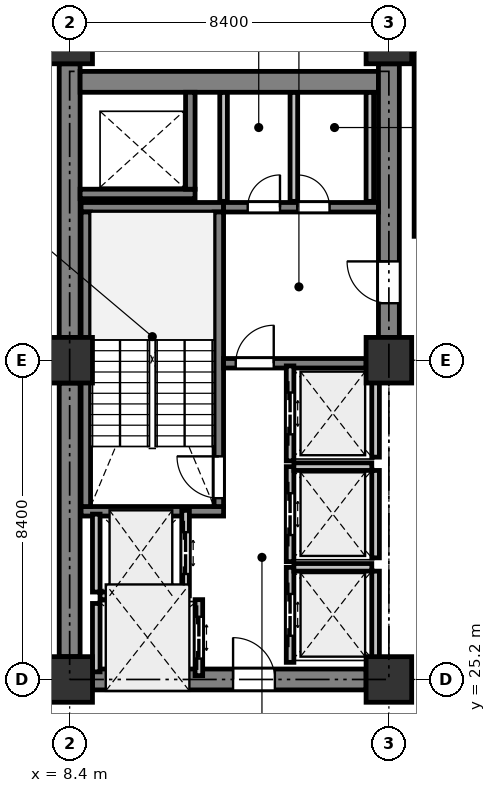
"""IFC4 building model, lengths in metres.
Left out: names, types, materials, properties, quantities, classifications, styles, units other than length and angle.
Written with IfcOpenShell. Run it as: python <this file> out.ifc"""

import sys

from ifc_helpers import new_model, si_unit, direction, frame, frame_2d, origin, origin_2d, place, context, subcontext, project, spatial, rectangle, extrude, element, fill, save


model = new_model("IFC4")
c1 = context("Model", 3, precision=1e-05, world=origin(), true_north=direction((0.0, 1.0)))
c2 = subcontext(c1, "Body", "Model", "MODEL_VIEW")
j1 = project(units=[si_unit("LENGTHUNIT", "METRE"), si_unit("PLANEANGLEUNIT", "RADIAN")], contexts=[c1])
p1 = place(None, origin())
s1 = spatial("IfcSite", under=j1, at=p1, CompositionType="ELEMENT")
p2 = place(p1, origin())
s2 = spatial("IfcBuilding", under=s1, at=p2, CompositionType="ELEMENT")
p3 = place(p2, frame((0.0, 0.0, 84.4)))
s3 = spatial("IfcBuildingStorey", under=s2, at=p3, CompositionType="ELEMENT", Elevation=84.4)
for number, where, z_axis, x_axis in (
    (1, (8.4, 25.2, 0.0), (0.0, 0.0, 1.0), (1.0, 0.0, 0.0)),
    (2, (8.4, 33.6, 0.0), (0.0, 0.0, 1.0), (1.0, 0.0, 0.0)),
    (3, (8.4, 42.0, 0.0), (0.0, 0.0, 1.0), (1.0, 0.0, 0.0)),
    (4, (16.8, 25.2, 0.0), (0.0, 0.0, 1.0), (1.0, 0.0, 0.0)),
    (5, (16.8, 33.6, 0.0), (0.0, 0.0, 1.0), (1.0, 0.0, 0.0)),
    (6, (16.8, 42.0, 0.0), (0.0, 0.0, 1.0), (1.0, 0.0, 0.0)),
):
    element("IfcColumn", number, at=place(p3, frame(where, z_axis=z_axis, x_axis=x_axis)), inside=s3, PredefinedType="COLUMN", context=c2, shape_type="SweptSolid", body=[
        extrude(rectangle(XDim=1.2, YDim=1.2, at=origin_2d()), origin(), (0.0, 0.0, 1.0), 4.1),
    ])
for number, where, z_axis, x_axis in (
    (7, (8.4, 25.8, 0.0), (0.0, 0.0, 1.0), (0.0, 1.0, 0.0)),
    (8, (8.4, 34.2, 0.0), (0.0, 0.0, 1.0), (0.0, 1.0, 0.0)),
):
    element("IfcWall", number, at=place(p3, frame(where, z_axis=z_axis, x_axis=x_axis)), inside=s3, PredefinedType="SHEAR", context=c2, shape_type="SweptSolid", body=[
        extrude(rectangle(XDim=7.2, YDim=0.55, at=frame_2d((3.6, 0.0))), origin(), (0.0, 0.0, 1.0), 3.825),
    ])
p4 = place(p3, frame((8.675, 40.925, 0.0), z_axis=(0.0, 0.0, 1.0), x_axis=(1.0, 0.0, 0.0)))
e9 = element("IfcWall", 9, at=p4, inside=s3, PredefinedType="SHEAR", context=c2, shape_type="SweptSolid", body=[
    extrude(rectangle(XDim=7.85, YDim=0.55, at=frame_2d((3.925, 0.0))), origin(), (0.0, 0.0, 1.0), 3.825),
])
p5 = place(p3, frame((16.8, 34.2, 0.0), z_axis=(0.0, 0.0, 1.0), x_axis=(0.0, 1.0, 0.0)))
e10 = element("IfcWall", 10, at=p5, inside=s3, PredefinedType="SHEAR", context=c2, shape_type="SweptSolid", body=[
    extrude(rectangle(XDim=7.2, YDim=0.55, at=frame_2d((3.6, 0.0))), origin(), (0.0, 0.0, 1.0), 3.825),
])
p6 = place(p5, frame((0.9, 0.0, 0.0)))
e11 = element("IfcOpeningElement", 11, at=p6, cuts=e10, PredefinedType="OPENING", context=c2, shape_type="SweptSolid", body=[
    extrude(rectangle(XDim=1.1, YDim=2.15, at=frame_2d((0.55, 1.075))), frame((0.0, 0.285, 0.0), z_axis=(0.0, -1.0, 0.0), x_axis=(1.0, 0.0, 0.0)), (0.0, 0.0, 1.0), 0.57),
])
p7 = place(p3, frame((9.0, 25.2, 0.0), z_axis=(0.0, 0.0, 1.0), x_axis=(1.0, 0.0, 0.0)))
e12 = element("IfcWall", 12, at=p7, inside=s3, PredefinedType="SHEAR", context=c2, shape_type="SweptSolid", body=[
    extrude(rectangle(XDim=7.2, YDim=0.55, at=frame_2d((3.6, 0.0))), origin(), (0.0, 0.0, 1.0), 3.825),
])
p8 = place(p7, frame((3.7, 0.0, 0.0)))
e13 = element("IfcOpeningElement", 13, at=p8, cuts=e12, PredefinedType="OPENING", context=c2, shape_type="SweptSolid", body=[
    extrude(rectangle(XDim=1.1, YDim=2.15, at=frame_2d((0.55, 1.075))), frame((0.0, 0.285, 0.0), z_axis=(0.0, -1.0, 0.0), x_axis=(1.0, 0.0, 0.0)), (0.0, 0.0, 1.0), 0.57),
])
for number, where, z_axis, x_axis in (
    (14, (12.45, 29.625, 0.0), (0.0, 0.0, 1.0), (-1.0, 0.0, 0.0)),
    (15, (12.45, 37.625, 0.0), (0.0, 0.0, 1.0), (-1.0, 0.0, 0.0)),
):
    element("IfcWall", number, at=place(p3, frame(where, z_axis=z_axis, x_axis=x_axis)), inside=s3, PredefinedType="SHEAR", context=c2, shape_type="SweptSolid", body=[
        extrude(rectangle(XDim=3.75, YDim=0.25, at=frame_2d((1.875, 0.0))), origin(), (0.0, 0.0, 1.0), 3.825),
    ])
p9 = place(p3, frame((12.325, 29.75, 0.0), z_axis=(0.0, 0.0, 1.0), x_axis=(0.0, 1.0, 0.0)))
e16 = element("IfcWall", 16, at=p9, inside=s3, PredefinedType="SHEAR", context=c2, shape_type="SweptSolid", body=[
    extrude(rectangle(XDim=7.75, YDim=0.25, at=frame_2d((3.875, 0.0))), origin(), (0.0, 0.0, 1.0), 3.825),
])
p10 = place(p9, frame((0.22, 0.0, 0.0)))
e17 = element("IfcOpeningElement", 17, at=p10, cuts=e16, PredefinedType="OPENING", context=c2, shape_type="SweptSolid", body=[
    extrude(rectangle(XDim=1.1, YDim=2.15, at=frame_2d((0.55, 1.075))), frame((0.0, 0.135, 0.0), z_axis=(0.0, -1.0, 0.0), x_axis=(1.0, 0.0, 0.0)), (0.0, 0.0, 1.0), 0.27),
])
p11 = place(p3, frame((8.825, 29.75, 0.0), z_axis=(0.0, 0.0, 1.0), x_axis=(0.0, 1.0, 0.0)))
e18 = element("IfcWall", 18, at=p11, inside=s3, PredefinedType="SHEAR", context=c2, shape_type="SweptSolid", body=[
    extrude(rectangle(XDim=7.75, YDim=0.25, at=frame_2d((3.875, 0.0))), origin(), (0.0, 0.0, 1.0), 3.825),
])
p12 = place(p3, frame((8.675, 37.975, 0.0), z_axis=(0.0, 0.0, 1.0), x_axis=(1.0, 0.0, 0.0)))
e19 = element("IfcWall", 19, at=p12, inside=s3, PredefinedType="SHEAR", context=c2, shape_type="SweptSolid", body=[
    extrude(rectangle(XDim=3.025, YDim=0.25, at=frame_2d((1.512, 0.0))), origin(), (0.0, 0.0, 1.0), 3.825),
])
p13 = place(p3, frame((11.575, 38.1, 0.0), z_axis=(0.0, 0.0, 1.0), x_axis=(0.0, 1.0, 0.0)))
e20 = element("IfcWall", 20, at=p13, inside=s3, PredefinedType="SHEAR", context=c2, shape_type="SweptSolid", body=[
    extrude(rectangle(XDim=2.55, YDim=0.25, at=frame_2d((1.275, 0.0))), origin(), (0.0, 0.0, 1.0), 3.825),
])
p14 = place(p3, frame((12.45, 33.52, 0.0), z_axis=(0.0, 0.0, 1.0), x_axis=(1.0, 0.0, 0.0)))
e21 = element("IfcWall", 21, at=p14, inside=s3, PredefinedType="SHEAR", context=c2, shape_type="SweptSolid", body=[
    extrude(rectangle(XDim=3.75, YDim=0.25, at=frame_2d((1.875, 0.0))), origin(), (0.0, 0.0, 1.0), 3.825),
])
p15 = place(p14, frame((0.32, 0.0, 0.0)))
e22 = element("IfcOpeningElement", 22, at=p15, cuts=e21, PredefinedType="OPENING", context=c2, shape_type="SweptSolid", body=[
    extrude(rectangle(XDim=1.0, YDim=2.15, at=frame_2d((0.5, 1.075))), frame((0.0, 0.135, 0.0), z_axis=(0.0, -1.0, 0.0), x_axis=(1.0, 0.0, 0.0)), (0.0, 0.0, 1.0), 0.27),
])
p16 = place(p3, frame((12.45, 37.625, 0.0), z_axis=(0.0, 0.0, 1.0), x_axis=(1.0, 0.0, 0.0)))
e23 = element("IfcWall", 23, at=p16, inside=s3, PredefinedType="SHEAR", context=c2, shape_type="SweptSolid", body=[
    extrude(rectangle(XDim=4.075, YDim=0.25, at=frame_2d((2.038, 0.0))), origin(), (0.0, 0.0, 1.0), 3.825),
])
p17 = place(p16, frame((0.635, 0.0, 0.0)))
e24 = element("IfcOpeningElement", 24, at=p17, cuts=e23, PredefinedType="OPENING", context=c2, shape_type="SweptSolid", body=[
    extrude(rectangle(XDim=0.85, YDim=2.15, at=frame_2d((0.425, 1.075))), frame((0.0, 0.135, 0.0), z_axis=(0.0, -1.0, 0.0), x_axis=(1.0, 0.0, 0.0)), (0.0, 0.0, 1.0), 0.27),
])
p18 = place(p16, frame((1.938, 0.0, 0.0)))
e25 = element("IfcOpeningElement", 25, at=p18, cuts=e23, PredefinedType="OPENING", context=c2, shape_type="SweptSolid", body=[
    extrude(rectangle(XDim=0.85, YDim=2.15, at=frame_2d((0.425, 1.075))), frame((0.0, 0.135, 0.0), z_axis=(0.0, -1.0, 0.0), x_axis=(1.0, 0.0, 0.0)), (0.0, 0.0, 1.0), 0.27),
])
p19 = place(p3, frame((11.45, 27.4, 0.0), z_axis=(0.0, 0.0, 1.0), x_axis=(0.0, 1.0, 0.0)))
e26 = element("IfcWall", 26, at=p19, inside=s3, PredefinedType="PARTITIONING", context=c2, shape_type="SweptSolid", body=[
    extrude(rectangle(XDim=2.25, YDim=0.2, at=frame_2d((1.125, 0.0))), origin(), (0.0, 0.0, 1.0), 3.825),
])
p20 = place(p19, frame((0.575, 0.0, 0.0)))
e27 = element("IfcOpeningElement", 27, at=p20, cuts=e26, PredefinedType="OPENING", context=c2, shape_type="SweptSolid", body=[
    extrude(rectangle(XDim=1.1, YDim=2.2, at=frame_2d((0.55, 1.1))), frame((0.0, 0.11, 0.0), z_axis=(0.0, -1.0, 0.0), x_axis=(1.0, 0.0, 0.0)), (0.0, 0.0, 1.0), 0.22),
])
p21 = place(p3, frame((9.1, 27.5, 0.0), z_axis=(0.0, 0.0, 1.0), x_axis=(0.0, 1.0, 0.0)))
e28 = element("IfcWall", 28, at=p21, inside=s3, PredefinedType="PARTITIONING", context=c2, shape_type="SweptSolid", body=[
    extrude(rectangle(XDim=2.05, YDim=0.2, at=frame_2d((1.025, 0.0))), origin(), (0.0, 0.0, 1.0), 3.825),
])
p22 = place(p3, frame((9.2, 27.4, 0.0), z_axis=(0.0, 0.0, 1.0), x_axis=(1.0, 0.0, 0.0)))
e29 = element("IfcWall", 29, at=p22, inside=s3, PredefinedType="PARTITIONING", context=c2, shape_type="SweptSolid", body=[
    extrude(rectangle(XDim=2.15, YDim=0.2, at=frame_2d((1.075, 0.0))), origin(), (0.0, 0.0, 1.0), 3.825),
])
p23 = place(p3, frame((11.8, 25.3, 0.0), z_axis=(0.0, 0.0, 1.0), x_axis=(0.0, 1.0, 0.0)))
e30 = element("IfcWall", 30, at=p23, inside=s3, PredefinedType="PARTITIONING", context=c2, shape_type="SweptSolid", body=[
    extrude(rectangle(XDim=2.0, YDim=0.2, at=frame_2d((1.0, 0.0))), origin(), (0.0, 0.0, 1.0), 3.825),
])
p24 = place(p23, frame((0.45, 0.0, 0.0)))
e31 = element("IfcOpeningElement", 31, at=p24, cuts=e30, PredefinedType="OPENING", context=c2, shape_type="SweptSolid", body=[
    extrude(rectangle(XDim=1.1, YDim=2.2, at=frame_2d((0.55, 1.1))), frame((0.0, 0.11, 0.0), z_axis=(0.0, -1.0, 0.0), x_axis=(1.0, 0.0, 0.0)), (0.0, 0.0, 1.0), 0.22),
])
p25 = place(p3, frame((9.1, 25.4, 0.0), z_axis=(0.0, 0.0, 1.0), x_axis=(0.0, 1.0, 0.0)))
e32 = element("IfcWall", 32, at=p25, inside=s3, PredefinedType="PARTITIONING", context=c2, shape_type="SweptSolid", body=[
    extrude(rectangle(XDim=1.8, YDim=0.2, at=frame_2d((0.9, 0.0))), origin(), (0.0, 0.0, 1.0), 3.825),
])
p26 = place(p3, frame((14.2, 25.65, 0.0), z_axis=(0.0, 0.0, 1.0), x_axis=(0.0, 1.0, 0.0)))
e33 = element("IfcWall", 33, at=p26, inside=s3, PredefinedType="PARTITIONING", context=c2, shape_type="SweptSolid", body=[
    extrude(rectangle(XDim=2.5, YDim=0.2, at=frame_2d((1.25, 0.0))), origin(), (0.0, 0.0, 1.0), 3.825),
])
p27 = place(p26, frame((0.7, 0.0, 0.0)))
e34 = element("IfcOpeningElement", 34, at=p27, cuts=e33, PredefinedType="OPENING", context=c2, shape_type="SweptSolid", body=[
    extrude(rectangle(XDim=1.1, YDim=2.2, at=frame_2d((0.55, 1.1))), frame((0.0, 0.11, 0.0), z_axis=(0.0, -1.0, 0.0), x_axis=(1.0, 0.0, 0.0)), (0.0, 0.0, 1.0), 0.22),
])
p28 = place(p3, frame((16.45, 25.75, 0.0), z_axis=(0.0, 0.0, 1.0), x_axis=(0.0, 1.0, 0.0)))
e35 = element("IfcWall", 35, at=p28, inside=s3, PredefinedType="PARTITIONING", context=c2, shape_type="SweptSolid", body=[
    extrude(rectangle(XDim=2.3, YDim=0.2, at=frame_2d((1.15, 0.0))), origin(), (0.0, 0.0, 1.0), 3.825),
])
p29 = place(p3, frame((14.3, 28.15, 0.0), z_axis=(0.0, 0.0, 1.0), x_axis=(1.0, 0.0, 0.0)))
e36 = element("IfcWall", 36, at=p29, inside=s3, PredefinedType="PARTITIONING", context=c2, shape_type="SweptSolid", body=[
    extrude(rectangle(XDim=2.05, YDim=0.2, at=frame_2d((1.025, 0.0))), origin(), (0.0, 0.0, 1.0), 3.825),
])
p30 = place(p3, frame((14.2, 28.3, 0.0), z_axis=(0.0, 0.0, 1.0), x_axis=(0.0, 1.0, 0.0)))
e37 = element("IfcWall", 37, at=p30, inside=s3, PredefinedType="PARTITIONING", context=c2, shape_type="SweptSolid", body=[
    extrude(rectangle(XDim=2.5, YDim=0.2, at=frame_2d((1.25, 0.0))), origin(), (0.0, 0.0, 1.0), 3.825),
])
p31 = place(p30, frame((0.7, 0.0, 0.0)))
e38 = element("IfcOpeningElement", 38, at=p31, cuts=e37, PredefinedType="OPENING", context=c2, shape_type="SweptSolid", body=[
    extrude(rectangle(XDim=1.1, YDim=2.2, at=frame_2d((0.55, 1.1))), frame((0.0, 0.11, 0.0), z_axis=(0.0, -1.0, 0.0), x_axis=(1.0, 0.0, 0.0)), (0.0, 0.0, 1.0), 0.22),
])
p32 = place(p3, frame((16.45, 28.4, 0.0), z_axis=(0.0, 0.0, 1.0), x_axis=(0.0, 1.0, 0.0)))
e39 = element("IfcWall", 39, at=p32, inside=s3, PredefinedType="PARTITIONING", context=c2, shape_type="SweptSolid", body=[
    extrude(rectangle(XDim=2.3, YDim=0.2, at=frame_2d((1.15, 0.0))), origin(), (0.0, 0.0, 1.0), 3.825),
])
p33 = place(p3, frame((14.3, 30.8, 0.0), z_axis=(0.0, 0.0, 1.0), x_axis=(1.0, 0.0, 0.0)))
e40 = element("IfcWall", 40, at=p33, inside=s3, PredefinedType="PARTITIONING", context=c2, shape_type="SweptSolid", body=[
    extrude(rectangle(XDim=2.05, YDim=0.2, at=frame_2d((1.025, 0.0))), origin(), (0.0, 0.0, 1.0), 3.825),
])
p34 = place(p3, frame((14.2, 30.95, 0.0), z_axis=(0.0, 0.0, 1.0), x_axis=(0.0, 1.0, 0.0)))
e41 = element("IfcWall", 41, at=p34, inside=s3, PredefinedType="PARTITIONING", context=c2, shape_type="SweptSolid", body=[
    extrude(rectangle(XDim=2.5, YDim=0.2, at=frame_2d((1.25, 0.0))), origin(), (0.0, 0.0, 1.0), 3.825),
])
p35 = place(p34, frame((0.7, 0.0, 0.0)))
e42 = element("IfcOpeningElement", 42, at=p35, cuts=e41, PredefinedType="OPENING", context=c2, shape_type="SweptSolid", body=[
    extrude(rectangle(XDim=1.1, YDim=2.2, at=frame_2d((0.55, 1.1))), frame((0.0, 0.11, 0.0), z_axis=(0.0, -1.0, 0.0), x_axis=(1.0, 0.0, 0.0)), (0.0, 0.0, 1.0), 0.22),
])
p36 = place(p3, frame((16.45, 31.05, 0.0), z_axis=(0.0, 0.0, 1.0), x_axis=(0.0, 1.0, 0.0)))
e43 = element("IfcWall", 43, at=p36, inside=s3, PredefinedType="PARTITIONING", context=c2, shape_type="SweptSolid", body=[
    extrude(rectangle(XDim=2.3, YDim=0.2, at=frame_2d((1.15, 0.0))), origin(), (0.0, 0.0, 1.0), 3.825),
])
for number, where, z_axis, x_axis in (
    (44, (14.3, 37.78, 0.0), (0.0, 0.0, 1.0), (0.0, 1.0, 0.0)),
    (45, (12.45, 40.646, 0.0), (0.0, 0.0, 1.0), (0.0, -1.0, 0.0)),
    (46, (16.3, 37.78, 0.0), (0.0, 0.0, 1.0), (0.0, 1.0, 0.0)),
):
    element("IfcWall", number, at=place(p3, frame(where, z_axis=z_axis, x_axis=x_axis)), inside=s3, PredefinedType="PARTITIONING", context=c2, shape_type="SweptSolid", body=[
        extrude(rectangle(XDim=2.866, YDim=0.2, at=frame_2d((1.433, 0.0))), origin(), (0.0, 0.0, 1.0), 2.725),
    ])
p37 = place(p3, frame((17.54, 36.86, 0.0), z_axis=(0.0, 0.0, 1.0), x_axis=(0.0, 1.0, 0.0)))
e47 = element("IfcWall", 47, at=p37, inside=s3, PredefinedType="PARTITIONING", context=c2, shape_type="SweptSolid", body=[
    extrude(rectangle(XDim=8.34, YDim=0.15, at=frame_2d((4.17, 0.0))), origin(), (0.0, 0.0, 1.0), 3.292),
])
p38 = place(p6, origin())
e48 = element("IfcDoor", 48, at=p38, inside=s3, OperationType="SINGLE_SWING_RIGHT", PredefinedType="DOOR", context=c2, shape_type="SweptSolid", body=[
    extrude(rectangle(XDim=1.1, YDim=2.15, at=frame_2d((0.55, 1.075))), frame((0.0, 0.025, 0.0), z_axis=(0.0, -1.0, 0.0), x_axis=(1.0, 0.0, 0.0)), (0.0, 0.0, 1.0), 0.05),
])
fill(e11, e48)
p39 = place(p8, origin())
e49 = element("IfcDoor", 49, at=p39, inside=s3, OperationType="SINGLE_SWING_LEFT", PredefinedType="DOOR", context=c2, shape_type="SweptSolid", body=[
    extrude(rectangle(XDim=1.1, YDim=2.15, at=frame_2d((0.55, 1.075))), frame((0.0, 0.025, 0.0), z_axis=(0.0, -1.0, 0.0), x_axis=(1.0, 0.0, 0.0)), (0.0, 0.0, 1.0), 0.05),
])
fill(e13, e49)
p40 = place(p10, origin())
e50 = element("IfcDoor", 50, at=p40, inside=s3, OperationType="SINGLE_SWING_RIGHT", PredefinedType="DOOR", context=c2, shape_type="SweptSolid", body=[
    extrude(rectangle(XDim=1.1, YDim=2.15, at=frame_2d((0.55, 1.075))), frame((0.0, 0.025, 0.0), z_axis=(0.0, -1.0, 0.0), x_axis=(1.0, 0.0, 0.0)), (0.0, 0.0, 1.0), 0.05),
])
fill(e17, e50)
p41 = place(p15, origin())
e51 = element("IfcDoor", 51, at=p41, inside=s3, OperationType="SINGLE_SWING_RIGHT", PredefinedType="DOOR", context=c2, shape_type="SweptSolid", body=[
    extrude(rectangle(XDim=1.0, YDim=2.15, at=frame_2d((0.5, 1.075))), frame((0.0, 0.025, 0.0), z_axis=(0.0, -1.0, 0.0), x_axis=(1.0, 0.0, 0.0)), (0.0, 0.0, 1.0), 0.05),
])
fill(e22, e51)
p42 = place(p20, origin())
e52 = element("IfcDoor", 52, at=p42, inside=s3, OperationType="DOUBLE_DOOR_SLIDING", PredefinedType="DOOR", context=c2, shape_type="SweptSolid", body=[
    extrude(rectangle(XDim=1.1, YDim=2.2, at=frame_2d((0.55, 1.1))), frame((0.0, 0.025, 0.0), z_axis=(0.0, -1.0, 0.0), x_axis=(1.0, 0.0, 0.0)), (0.0, 0.0, 1.0), 0.05),
])
fill(e27, e52)
p43 = place(p24, origin())
e53 = element("IfcDoor", 53, at=p43, inside=s3, OperationType="DOUBLE_DOOR_SLIDING", PredefinedType="DOOR", context=c2, shape_type="SweptSolid", body=[
    extrude(rectangle(XDim=1.1, YDim=2.2, at=frame_2d((0.55, 1.1))), frame((0.0, 0.025, 0.0), z_axis=(0.0, -1.0, 0.0), x_axis=(1.0, 0.0, 0.0)), (0.0, 0.0, 1.0), 0.05),
])
fill(e31, e53)
p44 = place(p27, origin())
e54 = element("IfcDoor", 54, at=p44, inside=s3, OperationType="DOUBLE_DOOR_SLIDING", PredefinedType="DOOR", context=c2, shape_type="SweptSolid", body=[
    extrude(rectangle(XDim=1.1, YDim=2.2, at=frame_2d((0.55, 1.1))), frame((0.0, 0.025, 0.0), z_axis=(0.0, -1.0, 0.0), x_axis=(1.0, 0.0, 0.0)), (0.0, 0.0, 1.0), 0.05),
])
fill(e34, e54)
p45 = place(p31, origin())
e55 = element("IfcDoor", 55, at=p45, inside=s3, OperationType="DOUBLE_DOOR_SLIDING", PredefinedType="DOOR", context=c2, shape_type="SweptSolid", body=[
    extrude(rectangle(XDim=1.1, YDim=2.2, at=frame_2d((0.55, 1.1))), frame((0.0, 0.025, 0.0), z_axis=(0.0, -1.0, 0.0), x_axis=(1.0, 0.0, 0.0)), (0.0, 0.0, 1.0), 0.05),
])
fill(e38, e55)
p46 = place(p35, origin())
e56 = element("IfcDoor", 56, at=p46, inside=s3, OperationType="DOUBLE_DOOR_SLIDING", PredefinedType="DOOR", context=c2, shape_type="SweptSolid", body=[
    extrude(rectangle(XDim=1.1, YDim=2.2, at=frame_2d((0.55, 1.1))), frame((0.0, 0.025, 0.0), z_axis=(0.0, -1.0, 0.0), x_axis=(1.0, 0.0, 0.0)), (0.0, 0.0, 1.0), 0.05),
])
fill(e42, e56)
p47 = place(p17, origin())
e57 = element("IfcDoor", 57, at=p47, inside=s3, OperationType="SINGLE_SWING_RIGHT", PredefinedType="DOOR", context=c2, shape_type="SweptSolid", body=[
    extrude(rectangle(XDim=0.85, YDim=2.15, at=frame_2d((0.425, 1.075))), frame((0.0, 0.025, 0.0), z_axis=(0.0, -1.0, 0.0), x_axis=(1.0, 0.0, 0.0)), (0.0, 0.0, 1.0), 0.05),
])
fill(e24, e57)
p48 = place(p18, origin())
e58 = element("IfcDoor", 58, at=p48, inside=s3, OperationType="SINGLE_SWING_LEFT", PredefinedType="DOOR", context=c2, shape_type="SweptSolid", body=[
    extrude(rectangle(XDim=0.85, YDim=2.15, at=frame_2d((0.425, 1.075))), frame((0.0, 0.025, 0.0), z_axis=(0.0, -1.0, 0.0), x_axis=(1.0, 0.0, 0.0)), (0.0, 0.0, 1.0), 0.05),
])
fill(e25, e58)
save(model, sys.argv[1])
